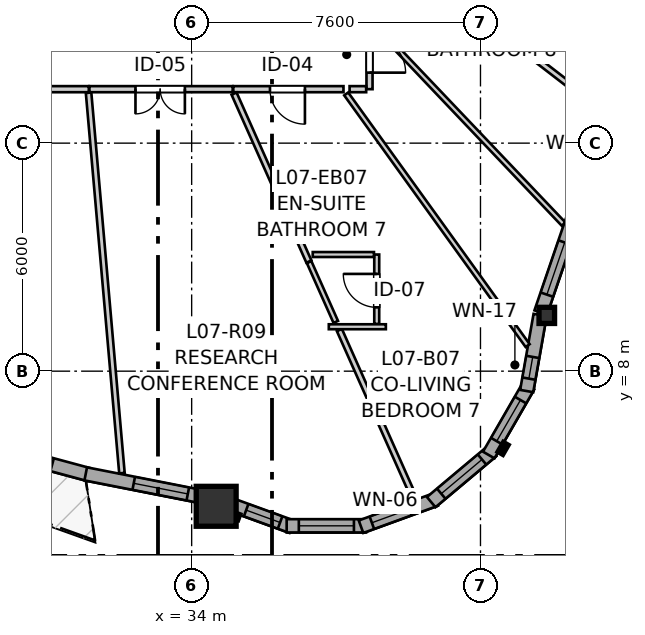
"""IFC4 building model, lengths in metres.
Left out: names, types, materials, properties, quantities, classifications, styles, units other than length and angle.
Written with IfcOpenShell. Run it as: python <this file> out.ifc"""

import sys

from ifc_helpers import new_model, si_unit, direction, frame, frame_2d, origin, origin_2d, place, context, subcontext, project, spatial, rectangle, i_section, extrude, source, transform, mapped, element, fill, save


model = new_model("IFC4")
c1 = context("Model", 3, precision=1e-05, world=origin(), true_north=direction((0.0, 1.0)))
c2 = subcontext(c1, "Body", "Model", "MODEL_VIEW")
j1 = project(units=[si_unit("LENGTHUNIT", "METRE"), si_unit("PLANEANGLEUNIT", "RADIAN")], contexts=[c1])
p1 = place(None, origin())
s1 = spatial("IfcSite", under=j1, at=p1, CompositionType="ELEMENT")
p2 = place(p1, origin())
s2 = spatial("IfcBuilding", under=s1, at=p2, CompositionType="ELEMENT")
p3 = place(p2, frame((0.0, 0.0, 27.0)))
s3 = spatial("IfcBuildingStorey", under=s2, at=p3, CompositionType="ELEMENT", Elevation=27.0)
m1 = source(origin(), c2, "Body", "SweptSolid", [
    extrude(rectangle(XDim=1.05, YDim=1.05, at=origin_2d()), origin(), (0.0, 0.0, 1.0), 2.935),
])
p4 = place(p3, frame((34.645, 4.445, 0.0), z_axis=(0.0, 0.0, 1.0), x_axis=(1.0, 0.0, 0.0)))
e1 = element("IfcColumn", 1, at=p4, inside=s3, PredefinedType="COLUMN", context=c2, shape_type="MappedRepresentation", body=[
    mapped(m1, transform((0.0, 0.0, 0.0), x_axis=(1.0, 0.0, 0.0), y_axis=(0.0, 1.0, 0.0), z_axis=(0.0, 0.0, 1.0), scale=1.0)),
])
m2 = source(origin(), c2, "Body", "SweptSolid", [
    extrude(i_section(OverallWidth=0.409, OverallDepth=0.425, WebThickness=0.03, FlangeThickness=0.048, FilletRadius=0.015, at=origin_2d()), origin(), (0.0, 0.0, 1.0), 2.935),
])
p5 = place(p3, frame((43.345, 9.468, 0.0), z_axis=(0.0, 0.0, 1.0), x_axis=(1.0, 0.0, 0.0)))
e2 = element("IfcColumn", 2, at=p5, inside=s3, PredefinedType="PILASTER", context=c2, shape_type="MappedRepresentation", body=[
    mapped(m2, transform((0.0, 0.0, 0.0), x_axis=(1.0, 0.0, 0.0), y_axis=(0.0, 1.0, 0.0), z_axis=(0.0, 0.0, 1.0), scale=1.0)),
])
p6 = place(p3, frame((27.978, 6.174, 0.0), z_axis=(0.0, 0.0, 1.0), x_axis=(0.965451765427, -0.260581827136, 0.0)))
e3 = element("IfcWall", 3, at=p6, inside=s3, PredefinedType="SOLIDWALL", context=c2, shape_type="SweptSolid", body=[
    extrude(rectangle(XDim=3.439, YDim=0.35, at=frame_2d((1.72, 0.0))), origin(), (0.0, 0.0, 1.0), 2.415),
])
p7 = place(p6, frame((0.985, 0.0, 0.82)))
e4 = element("IfcOpeningElement", 4, at=p7, cuts=e3, PredefinedType="OPENING", context=c2, shape_type="SweptSolid", body=[
    extrude(rectangle(XDim=1.45, YDim=1.25, at=frame_2d((0.725, 0.625))), frame((0.0, 0.185, 0.0), z_axis=(0.0, -1.0, 0.0), x_axis=(1.0, 0.0, 0.0)), (0.0, 0.0, 1.0), 0.37),
])
p8 = place(p3, frame((31.213, 5.298, 0.0), z_axis=(0.0, 0.0, 1.0), x_axis=(0.9812345335, -0.192818023709, 0.0)))
e5 = element("IfcWall", 5, at=p8, inside=s3, PredefinedType="SOLIDWALL", context=c2, shape_type="SweptSolid", body=[
    extrude(rectangle(XDim=3.232, YDim=0.35, at=frame_2d((1.616, 0.0))), origin(), (0.0, 0.0, 1.0), 2.415),
])
p9 = place(p8, frame((1.287, 0.0, 0.82)))
e6 = element("IfcOpeningElement", 6, at=p9, cuts=e5, PredefinedType="OPENING", context=c2, shape_type="SweptSolid", body=[
    extrude(rectangle(XDim=1.45, YDim=1.25, at=frame_2d((0.725, 0.625))), frame((0.0, 0.185, 0.0), z_axis=(0.0, -1.0, 0.0), x_axis=(1.0, 0.0, 0.0)), (0.0, 0.0, 1.0), 0.37),
])
p10 = place(p3, frame((34.987, 4.506, 0.0), z_axis=(0.0, 0.0, 1.0), x_axis=(0.939720171257, -0.341944439541, 0.0)))
e7 = element("IfcWall", 7, at=p10, inside=s3, PredefinedType="SOLIDWALL", context=c2, shape_type="SweptSolid", body=[
    extrude(rectangle(XDim=1.752, YDim=0.35, at=frame_2d((0.876, 0.0))), origin(), (0.0, 0.0, 1.0), 2.415),
])
p11 = place(p10, frame((0.476, 0.0, 0.82)))
e8 = element("IfcOpeningElement", 8, at=p11, cuts=e7, PredefinedType="OPENING", context=c2, shape_type="SweptSolid", body=[
    extrude(rectangle(XDim=0.95, YDim=1.35, at=frame_2d((0.475, 0.675))), frame((0.0, 0.185, 0.0), z_axis=(0.0, -1.0, 0.0), x_axis=(1.0, 0.0, 0.0)), (0.0, 0.0, 1.0), 0.37),
])
p12 = place(p3, frame((36.5, 3.931, 0.0), z_axis=(0.0, 0.0, 1.0), x_axis=(1.0, 0.0, 0.0)))
e9 = element("IfcWall", 9, at=p12, inside=s3, PredefinedType="SOLIDWALL", context=c2, shape_type="SweptSolid", body=[
    extrude(rectangle(XDim=2.09, YDim=0.35, at=frame_2d((1.045, 0.0))), origin(), (0.0, 0.0, 1.0), 2.415),
])
p13 = place(p12, frame((0.32, 0.0, 0.82)))
e10 = element("IfcOpeningElement", 10, at=p13, cuts=e9, PredefinedType="OPENING", context=c2, shape_type="SweptSolid", body=[
    extrude(rectangle(XDim=1.45, YDim=1.25, at=frame_2d((0.725, 0.625))), frame((0.0, 0.185, 0.0), z_axis=(0.0, -1.0, 0.0), x_axis=(1.0, 0.0, 0.0)), (0.0, 0.0, 1.0), 0.37),
])
p14 = place(p3, frame((38.457, 3.907, 0.0), z_axis=(0.0, 0.0, 1.0), x_axis=(0.939711556618, 0.341968113072, 0.0)))
e11 = element("IfcWall", 11, at=p14, inside=s3, PredefinedType="SOLIDWALL", context=c2, shape_type="SweptSolid", body=[
    extrude(rectangle(XDim=2.09, YDim=0.35, at=frame_2d((1.045, 0.0))), origin(), (0.0, 0.0, 1.0), 2.415),
])
p15 = place(p14, frame((0.304, 0.0, 0.82)))
e12 = element("IfcOpeningElement", 12, at=p15, cuts=e11, PredefinedType="OPENING", context=c2, shape_type="SweptSolid", body=[
    extrude(rectangle(XDim=1.05, YDim=1.45, at=frame_2d((0.525, 0.725))), frame((0.0, 0.185, 0.0), z_axis=(0.0, -1.0, 0.0), x_axis=(1.0, 0.0, 0.0)), (0.0, 0.0, 1.0), 0.37),
])
p16 = place(p3, frame((40.303, 4.554, 0.0), z_axis=(0.0, 0.0, 1.0), x_axis=(0.766024572719, 0.642811289563, 0.0)))
e13 = element("IfcWall", 13, at=p16, inside=s3, PredefinedType="SOLIDWALL", context=c2, shape_type="SweptSolid", body=[
    extrude(rectangle(XDim=2.09, YDim=0.35, at=frame_2d((1.045, 0.0))), origin(), (0.0, 0.0, 1.0), 2.415),
])
p17 = place(p16, frame((0.345, 0.0, 0.82)))
e14 = element("IfcOpeningElement", 14, at=p17, cuts=e13, PredefinedType="OPENING", context=c2, shape_type="SweptSolid", body=[
    extrude(rectangle(XDim=1.4, YDim=1.35, at=frame_2d((0.7, 0.675))), frame((0.0, 0.185, 0.0), z_axis=(0.0, -1.0, 0.0), x_axis=(1.0, 0.0, 0.0)), (0.0, 0.0, 1.0), 0.37),
])
p18 = place(p3, frame((41.817, 5.794, 0.0), z_axis=(0.0, 0.0, 1.0), x_axis=(0.499995423472, 0.866028046028, 0.0)))
e15 = element("IfcWall", 15, at=p18, inside=s3, PredefinedType="SOLIDWALL", context=c2, shape_type="SweptSolid", body=[
    extrude(rectangle(XDim=2.09, YDim=0.35, at=frame_2d((1.045, 0.0))), origin(), (0.0, 0.0, 1.0), 2.415),
])
p19 = place(p18, frame((0.42, 0.0, 0.82)))
e16 = element("IfcOpeningElement", 16, at=p19, cuts=e15, PredefinedType="OPENING", context=c2, shape_type="SweptSolid", body=[
    extrude(rectangle(XDim=1.25, YDim=1.35, at=frame_2d((0.625, 0.675))), frame((0.0, 0.185, 0.0), z_axis=(0.0, -1.0, 0.0), x_axis=(1.0, 0.0, 0.0)), (0.0, 0.0, 1.0), 0.37),
])
p20 = place(p3, frame((42.816, 7.477, 0.0), z_axis=(0.0, 0.0, 1.0), x_axis=(0.173586593252, 0.984818610021, 0.0)))
e17 = element("IfcWall", 17, at=p20, inside=s3, PredefinedType="SOLIDWALL", context=c2, shape_type="SweptSolid", body=[
    extrude(rectangle(XDim=2.032, YDim=0.35, at=frame_2d((1.016, 0.0))), origin(), (0.0, 0.0, 1.0), 2.415),
])
p21 = place(p20, frame((0.332, 0.0, 0.82)))
e18 = element("IfcOpeningElement", 18, at=p21, cuts=e17, PredefinedType="OPENING", context=c2, shape_type="SweptSolid", body=[
    extrude(rectangle(XDim=0.58, YDim=1.35, at=frame_2d((0.29, 0.675))), frame((0.0, 0.185, 0.0), z_axis=(0.0, -1.0, 0.0), x_axis=(1.0, 0.0, 0.0)), (0.0, 0.0, 1.0), 0.37),
])
p22 = place(p3, frame((43.186, 9.543, 0.0), z_axis=(0.0, 0.0, 1.0), x_axis=(0.323620542135, 0.946186950189, 0.0)))
e19 = element("IfcWall", 19, at=p22, inside=s3, PredefinedType="SOLIDWALL", context=c2, shape_type="SweptSolid", body=[
    extrude(rectangle(XDim=3.512, YDim=0.35, at=frame_2d((1.756, 0.0))), origin(), (0.0, 0.0, 1.0), 2.415),
])
p23 = place(p22, frame((0.498, 0.0, 0.82)))
e20 = element("IfcOpeningElement", 20, at=p23, cuts=e19, PredefinedType="OPENING", context=c2, shape_type="SweptSolid", body=[
    extrude(rectangle(XDim=1.45, YDim=1.25, at=frame_2d((0.725, 0.625))), frame((0.0, 0.185, 0.0), z_axis=(0.0, -1.0, 0.0), x_axis=(1.0, 0.0, 0.0)), (0.0, 0.0, 1.0), 0.37),
])
p24 = place(p22, frame((2.619, 0.0, 0.82)))
e21 = element("IfcOpeningElement", 21, at=p24, cuts=e19, PredefinedType="OPENING", context=c2, shape_type="SweptSolid", body=[
    extrude(rectangle(XDim=0.58, YDim=1.35, at=frame_2d((0.29, 0.675))), frame((0.0, 0.185, 0.0), z_axis=(0.0, -1.0, 0.0), x_axis=(1.0, 0.0, 0.0)), (0.0, 0.0, 1.0), 0.37),
])
p25 = place(p3, frame((31.294, 15.42, 0.0), z_axis=(0.0, 0.0, 1.0), x_axis=(-1.0, 0.0, 0.0)))
e22 = element("IfcWall", 22, at=p25, inside=s3, PredefinedType="PARTITIONING", context=c2, shape_type="SweptSolid", body=[
    extrude(rectangle(XDim=5.554, YDim=0.16, at=frame_2d((2.777, 0.0))), origin(), (0.0, 0.0, 1.0), 2.935),
])
p26 = place(p25, frame((2.126, 0.0, 0.0)))
e23 = element("IfcOpeningElement", 23, at=p26, cuts=e22, PredefinedType="OPENING", context=c2, shape_type="SweptSolid", body=[
    extrude(rectangle(XDim=1.3, YDim=2.1, at=frame_2d((0.65, 1.05))), frame((0.0, 0.09, 0.0), z_axis=(0.0, -1.0, 0.0), x_axis=(1.0, 0.0, 0.0)), (0.0, 0.0, 1.0), 0.18),
])
p27 = place(p3, frame((35.08, 15.42, 0.0), z_axis=(0.0, 0.0, 1.0), x_axis=(-1.0, 0.0, 0.0)))
e24 = element("IfcWall", 24, at=p27, inside=s3, PredefinedType="PARTITIONING", context=c2, shape_type="SweptSolid", body=[
    extrude(rectangle(XDim=3.771, YDim=0.16, at=frame_2d((1.885, 0.0))), origin(), (0.0, 0.0, 1.0), 2.935),
])
p28 = place(p27, frame((1.259, 0.0, 0.0)))
e25 = element("IfcOpeningElement", 25, at=p28, cuts=e24, PredefinedType="OPENING", context=c2, shape_type="SweptSolid", body=[
    extrude(rectangle(XDim=1.3, YDim=2.1, at=frame_2d((0.65, 1.05))), frame((0.0, 0.09, 0.0), z_axis=(0.0, -1.0, 0.0), x_axis=(1.0, 0.0, 0.0)), (0.0, 0.0, 1.0), 0.18),
])
p29 = place(p3, frame((37.995, 15.42, 0.0), z_axis=(0.0, 0.0, 1.0), x_axis=(-1.0, 0.0, 0.0)))
e26 = element("IfcWall", 26, at=p29, inside=s3, PredefinedType="PARTITIONING", context=c2, shape_type="SweptSolid", body=[
    extrude(rectangle(XDim=2.9, YDim=0.16, at=frame_2d((1.45, 0.0))), origin(), (0.0, 0.0, 1.0), 2.935),
])
p30 = place(p29, frame((1.014, 0.0, 0.0)))
e27 = element("IfcOpeningElement", 27, at=p30, cuts=e26, PredefinedType="OPENING", context=c2, shape_type="SweptSolid", body=[
    extrude(rectangle(XDim=0.92, YDim=2.1, at=frame_2d((0.46, 1.05))), frame((0.0, 0.09, 0.0), z_axis=(0.0, -1.0, 0.0), x_axis=(1.0, 0.0, 0.0)), (0.0, 0.0, 1.0), 0.18),
])
p31 = place(p3, frame((38.87, 9.242, 0.0), z_axis=(0.0, 0.0, 1.0), x_axis=(0.0, 1.0, 0.0)))
e28 = element("IfcWall", 28, at=p31, inside=s3, PredefinedType="PARTITIONING", context=c2, shape_type="SweptSolid", body=[
    extrude(rectangle(XDim=1.827, YDim=0.13, at=frame_2d((0.914, 0.0))), origin(), (0.0, 0.0, 1.0), 2.935),
])
p32 = place(p31, frame((0.437, 0.0, 0.0)))
e29 = element("IfcOpeningElement", 29, at=p32, cuts=e28, PredefinedType="OPENING", context=c2, shape_type="SweptSolid", body=[
    extrude(rectangle(XDim=0.88, YDim=2.05, at=frame_2d((0.44, 1.025))), frame((0.0, 0.075, 0.0), z_axis=(0.0, -1.0, 0.0), x_axis=(1.0, 0.0, 0.0)), (0.0, 0.0, 1.0), 0.15),
])
p33 = place(p3, frame((38.68, 17.203, 0.0), z_axis=(0.0, 0.0, 1.0), x_axis=(0.0, -1.0, 0.0)))
e30 = element("IfcWall", 30, at=p33, inside=s3, PredefinedType="PARTITIONING", context=c2, shape_type="SweptSolid", body=[
    extrude(rectangle(XDim=1.783, YDim=0.16, at=frame_2d((0.892, 0.0))), origin(), (0.0, 0.0, 1.0), 2.935),
])
p34 = place(p33, frame((0.398, 0.0, 0.0)))
e31 = element("IfcOpeningElement", 31, at=p34, cuts=e30, PredefinedType="OPENING", context=c2, shape_type="SweptSolid", body=[
    extrude(rectangle(XDim=0.95, YDim=2.1, at=frame_2d((0.475, 1.05))), frame((0.0, 0.09, 0.0), z_axis=(0.0, -1.0, 0.0), x_axis=(1.0, 0.0, 0.0)), (0.0, 0.0, 1.0), 0.18),
])
p35 = place(p3, frame((31.287, 15.326, 0.0), z_axis=(0.0, 0.0, 1.0), x_axis=(0.087404477037, -0.99617290537, 0.0)))
e32 = element("IfcWall", 32, at=p35, inside=s3, PredefinedType="PARTITIONING", context=c2, shape_type="SweptSolid", body=[
    extrude(rectangle(XDim=10.047, YDim=0.145, at=frame_2d((5.023, 0.0))), origin(), (0.0, 0.0, 1.0), 2.935),
])
p36 = place(p3, frame((38.067, 15.295, 0.0), z_axis=(0.0, 0.0, 1.0), x_axis=(0.584777320582, -0.811193864211, 0.0)))
e33 = element("IfcWall", 33, at=p36, inside=s3, PredefinedType="PARTITIONING", context=c2, shape_type="SweptSolid", body=[
    extrude(rectangle(XDim=8.164, YDim=0.13, at=frame_2d((4.082, 0.0))), origin(), (0.0, 0.0, 1.0), 2.935),
])
p37 = place(p3, frame((38.812, 17.101, 0.0), z_axis=(0.0, 0.0, 1.0), x_axis=(0.689140556814, -0.724627692649, 0.0)))
e34 = element("IfcWall", 34, at=p37, inside=s3, PredefinedType="PARTITIONING", context=c2, shape_type="SweptSolid", body=[
    extrude(rectangle(XDim=7.217, YDim=0.13, at=frame_2d((3.608, 0.0))), origin(), (0.0, 0.0, 1.0), 2.935),
])
p38 = place(p3, frame((40.649, 18.066, 0.0), z_axis=(0.0, 0.0, 1.0), x_axis=(0.792155051101, -0.610319895641, 0.0)))
e35 = element("IfcWall", 35, at=p38, inside=s3, PredefinedType="PARTITIONING", context=c2, shape_type="SweptSolid", body=[
    extrude(rectangle(XDim=5.093, YDim=0.145, at=frame_2d((2.546, 0.0))), origin(), (0.0, 0.0, 1.0), 2.935),
])
p39 = place(p3, frame((37.887, 9.082, 0.0), z_axis=(0.0, 0.0, 1.0), x_axis=(0.406941066305, -0.913454415149, 0.0)))
e36 = element("IfcWall", 36, at=p39, inside=s3, PredefinedType="PARTITIONING", context=c2, shape_type="SweptSolid", body=[
    extrude(rectangle(XDim=4.882, YDim=0.145, at=frame_2d((2.441, 0.0))), origin(), (0.0, 0.0, 1.0), 2.935),
])
p40 = place(p3, frame((35.116, 15.303, 0.0), z_axis=(0.0, 0.0, 1.0), x_axis=(0.406910733823, -0.913467927571, 0.0)))
e37 = element("IfcWall", 37, at=p40, inside=s3, PredefinedType="PARTITIONING", context=c2, shape_type="SweptSolid", body=[
    extrude(rectangle(XDim=4.839, YDim=0.145, at=frame_2d((2.419, 0.0))), origin(), (0.0, 0.0, 1.0), 2.935),
])
p41 = place(p3, frame((37.091, 10.869, 0.0), z_axis=(0.0, 0.0, 1.0), x_axis=(0.406835672622, -0.913501360416, 0.0)))
e38 = element("IfcWall", 38, at=p41, inside=s3, PredefinedType="PARTITIONING", context=c2, shape_type="SweptSolid", body=[
    extrude(rectangle(XDim=1.722, YDim=0.13, at=frame_2d((0.861, 0.0))), origin(), (0.0, 0.0, 1.0), 2.935),
])
p42 = place(p3, frame((37.186, 11.069, 0.0), z_axis=(0.0, 0.0, 1.0), x_axis=(1.0, 0.0, 0.0)))
e39 = element("IfcWall", 39, at=p42, inside=s3, PredefinedType="PARTITIONING", context=c2, shape_type="SweptSolid", body=[
    extrude(rectangle(XDim=1.611, YDim=0.13, at=frame_2d((0.805, 0.0))), origin(), (0.0, 0.0, 1.0), 2.935),
])
p43 = place(p3, frame((37.609, 9.169, 0.0), z_axis=(0.0, 0.0, 1.0), x_axis=(1.0, 0.0, 0.0)))
e40 = element("IfcWall", 40, at=p43, inside=s3, PredefinedType="PARTITIONING", context=c2, shape_type="SweptSolid", body=[
    extrude(rectangle(XDim=1.501, YDim=0.13, at=frame_2d((0.75, 0.0))), origin(), (0.0, 0.0, 1.0), 2.935),
])
p44 = place(p3, frame((38.156, 15.42, 0.0), z_axis=(0.0, 0.0, 1.0), x_axis=(1.0, 0.0, 0.0)))
e41 = element("IfcWall", 41, at=p44, inside=s3, PredefinedType="PARTITIONING", context=c2, shape_type="SweptSolid", body=[
    extrude(rectangle(XDim=0.436, YDim=0.16, at=frame_2d((0.218, 0.0))), origin(), (0.0, 0.0, 1.0), 2.935),
])
m3 = source(origin(), c2, "Body", "SweptSolid", [
    extrude(rectangle(XDim=1.45, YDim=1.25, at=frame_2d((0.725, 0.625))), frame((0.0, 0.03, 0.0), z_axis=(0.0, -1.0, 0.0), x_axis=(1.0, 0.0, 0.0)), (0.0, 0.0, 1.0), 0.06),
])
p45 = place(p7, origin())
e42 = element("IfcWindow", 42, at=p45, inside=s3, PartitioningType="SINGLE_PANEL", PredefinedType="WINDOW", context=c2, shape_type="MappedRepresentation", body=[
    mapped(m3, transform((0.0, 0.0, 0.0), x_axis=(1.0, 0.0, 0.0), y_axis=(0.0, 1.0, 0.0), z_axis=(0.0, 0.0, 1.0), scale=1.0)),
])
fill(e4, e42)
p46 = place(p9, origin())
e43 = element("IfcWindow", 43, at=p46, inside=s3, PartitioningType="SINGLE_PANEL", PredefinedType="WINDOW", context=c2, shape_type="MappedRepresentation", body=[
    mapped(m3, transform((0.0, 0.0, 0.0), x_axis=(1.0, 0.0, 0.0), y_axis=(0.0, 1.0, 0.0), z_axis=(0.0, 0.0, 1.0), scale=1.0)),
])
fill(e6, e43)
m4 = source(origin(), c2, "Body", "SweptSolid", [
    extrude(rectangle(XDim=0.95, YDim=1.35, at=frame_2d((0.475, 0.675))), frame((0.0, 0.03, 0.0), z_axis=(0.0, -1.0, 0.0), x_axis=(1.0, 0.0, 0.0)), (0.0, 0.0, 1.0), 0.06),
])
p47 = place(p11, origin())
e44 = element("IfcWindow", 44, at=p47, inside=s3, PartitioningType="SINGLE_PANEL", PredefinedType="WINDOW", context=c2, shape_type="MappedRepresentation", body=[
    mapped(m4, transform((0.0, 0.0, 0.0), x_axis=(1.0, 0.0, 0.0), y_axis=(0.0, 1.0, 0.0), z_axis=(0.0, 0.0, 1.0), scale=1.0)),
])
fill(e8, e44)
p48 = place(p13, origin())
e45 = element("IfcWindow", 45, at=p48, inside=s3, PartitioningType="SINGLE_PANEL", PredefinedType="WINDOW", context=c2, shape_type="MappedRepresentation", body=[
    mapped(m3, transform((0.0, 0.0, 0.0), x_axis=(1.0, 0.0, 0.0), y_axis=(0.0, 1.0, 0.0), z_axis=(0.0, 0.0, 1.0), scale=1.0)),
])
fill(e10, e45)
m5 = source(origin(), c2, "Body", "SweptSolid", [
    extrude(rectangle(XDim=1.05, YDim=1.45, at=frame_2d((0.525, 0.725))), frame((0.0, 0.03, 0.0), z_axis=(0.0, -1.0, 0.0), x_axis=(1.0, 0.0, 0.0)), (0.0, 0.0, 1.0), 0.06),
])
p49 = place(p15, origin())
e46 = element("IfcWindow", 46, at=p49, inside=s3, PartitioningType="SINGLE_PANEL", PredefinedType="WINDOW", context=c2, shape_type="MappedRepresentation", body=[
    mapped(m5, transform((0.0, 0.0, 0.0), x_axis=(1.0, 0.0, 0.0), y_axis=(0.0, 1.0, 0.0), z_axis=(0.0, 0.0, 1.0), scale=1.0)),
])
fill(e12, e46)
m6 = source(origin(), c2, "Body", "SweptSolid", [
    extrude(rectangle(XDim=1.4, YDim=1.35, at=frame_2d((0.7, 0.675))), frame((0.0, 0.03, 0.0), z_axis=(0.0, -1.0, 0.0), x_axis=(1.0, 0.0, 0.0)), (0.0, 0.0, 1.0), 0.06),
])
p50 = place(p17, origin())
e47 = element("IfcWindow", 47, at=p50, inside=s3, PartitioningType="SINGLE_PANEL", PredefinedType="WINDOW", context=c2, shape_type="MappedRepresentation", body=[
    mapped(m6, transform((0.0, 0.0, 0.0), x_axis=(1.0, 0.0, 0.0), y_axis=(0.0, 1.0, 0.0), z_axis=(0.0, 0.0, 1.0), scale=1.0)),
])
fill(e14, e47)
m7 = source(origin(), c2, "Body", "SweptSolid", [
    extrude(rectangle(XDim=1.25, YDim=1.35, at=frame_2d((0.625, 0.675))), frame((0.0, 0.03, 0.0), z_axis=(0.0, -1.0, 0.0), x_axis=(1.0, 0.0, 0.0)), (0.0, 0.0, 1.0), 0.06),
])
p51 = place(p19, origin())
e48 = element("IfcWindow", 48, at=p51, inside=s3, PartitioningType="SINGLE_PANEL", PredefinedType="WINDOW", context=c2, shape_type="MappedRepresentation", body=[
    mapped(m7, transform((0.0, 0.0, 0.0), x_axis=(1.0, 0.0, 0.0), y_axis=(0.0, 1.0, 0.0), z_axis=(0.0, 0.0, 1.0), scale=1.0)),
])
fill(e16, e48)
m8 = source(origin(), c2, "Body", "SweptSolid", [
    extrude(rectangle(XDim=0.58, YDim=1.35, at=frame_2d((0.29, 0.675))), frame((0.0, 0.03, 0.0), z_axis=(0.0, -1.0, 0.0), x_axis=(1.0, 0.0, 0.0)), (0.0, 0.0, 1.0), 0.06),
])
p52 = place(p21, origin())
e49 = element("IfcWindow", 49, at=p52, inside=s3, PartitioningType="SINGLE_PANEL", PredefinedType="WINDOW", context=c2, shape_type="MappedRepresentation", body=[
    mapped(m8, transform((0.0, 0.0, 0.0), x_axis=(1.0, 0.0, 0.0), y_axis=(0.0, 1.0, 0.0), z_axis=(0.0, 0.0, 1.0), scale=1.0)),
])
fill(e18, e49)
p53 = place(p23, origin())
e50 = element("IfcWindow", 50, at=p53, inside=s3, PartitioningType="SINGLE_PANEL", PredefinedType="WINDOW", context=c2, shape_type="MappedRepresentation", body=[
    mapped(m3, transform((0.0, 0.0, 0.0), x_axis=(1.0, 0.0, 0.0), y_axis=(0.0, 1.0, 0.0), z_axis=(0.0, 0.0, 1.0), scale=1.0)),
])
fill(e20, e50)
m9 = source(origin(), c2, "Body", "SweptSolid", [
    extrude(rectangle(XDim=1.3, YDim=2.1, at=frame_2d((0.65, 1.05))), frame((0.0, 0.025, 0.0), z_axis=(0.0, -1.0, 0.0), x_axis=(1.0, 0.0, 0.0)), (0.0, 0.0, 1.0), 0.05),
])
p54 = place(p28, origin())
e51 = element("IfcDoor", 51, at=p54, inside=s3, OperationType="DOUBLE_DOOR_SINGLE_SWING", PredefinedType="DOOR", context=c2, shape_type="MappedRepresentation", body=[
    mapped(m9, transform((0.0, 0.0, 0.0), x_axis=(1.0, 0.0, 0.0), y_axis=(0.0, 1.0, 0.0), z_axis=(0.0, 0.0, 1.0), scale=1.0)),
])
fill(e25, e51)
m10 = source(origin(), c2, "Body", "SweptSolid", [
    extrude(rectangle(XDim=0.92, YDim=2.1, at=frame_2d((0.46, 1.05))), frame((0.0, 0.025, 0.0), z_axis=(0.0, -1.0, 0.0), x_axis=(1.0, 0.0, 0.0)), (0.0, 0.0, 1.0), 0.05),
])
p55 = place(p30, origin())
e52 = element("IfcDoor", 52, at=p55, inside=s3, OperationType="SINGLE_SWING_LEFT", PredefinedType="DOOR", context=c2, shape_type="MappedRepresentation", body=[
    mapped(m10, transform((0.0, 0.0, 0.0), x_axis=(1.0, 0.0, 0.0), y_axis=(0.0, 1.0, 0.0), z_axis=(0.0, 0.0, 1.0), scale=1.0)),
])
fill(e27, e52)
m11 = source(origin(), c2, "Body", "SweptSolid", [
    extrude(rectangle(XDim=0.88, YDim=2.05, at=frame_2d((0.44, 1.025))), frame((0.0, 0.025, 0.0), z_axis=(0.0, -1.0, 0.0), x_axis=(1.0, 0.0, 0.0)), (0.0, 0.0, 1.0), 0.05),
])
p56 = place(p32, origin())
e53 = element("IfcDoor", 53, at=p56, inside=s3, OperationType="SINGLE_SWING_RIGHT", PredefinedType="DOOR", context=c2, shape_type="MappedRepresentation", body=[
    mapped(m11, transform((0.0, 0.0, 0.0), x_axis=(1.0, 0.0, 0.0), y_axis=(0.0, 1.0, 0.0), z_axis=(0.0, 0.0, 1.0), scale=1.0)),
])
fill(e29, e53)
m12 = source(origin(), c2, "Body", "SweptSolid", [
    extrude(rectangle(XDim=0.95, YDim=2.1, at=frame_2d((0.475, 1.05))), frame((0.0, 0.025, 0.0), z_axis=(0.0, -1.0, 0.0), x_axis=(1.0, 0.0, 0.0)), (0.0, 0.0, 1.0), 0.05),
])
p57 = place(p34, origin())
e54 = element("IfcDoor", 54, at=p57, inside=s3, OperationType="SINGLE_SWING_RIGHT", PredefinedType="DOOR", context=c2, shape_type="MappedRepresentation", body=[
    mapped(m12, transform((0.0, 0.0, 0.0), x_axis=(1.0, 0.0, 0.0), y_axis=(0.0, 1.0, 0.0), z_axis=(0.0, 0.0, 1.0), scale=1.0)),
])
fill(e31, e54)
save(model, sys.argv[1])
